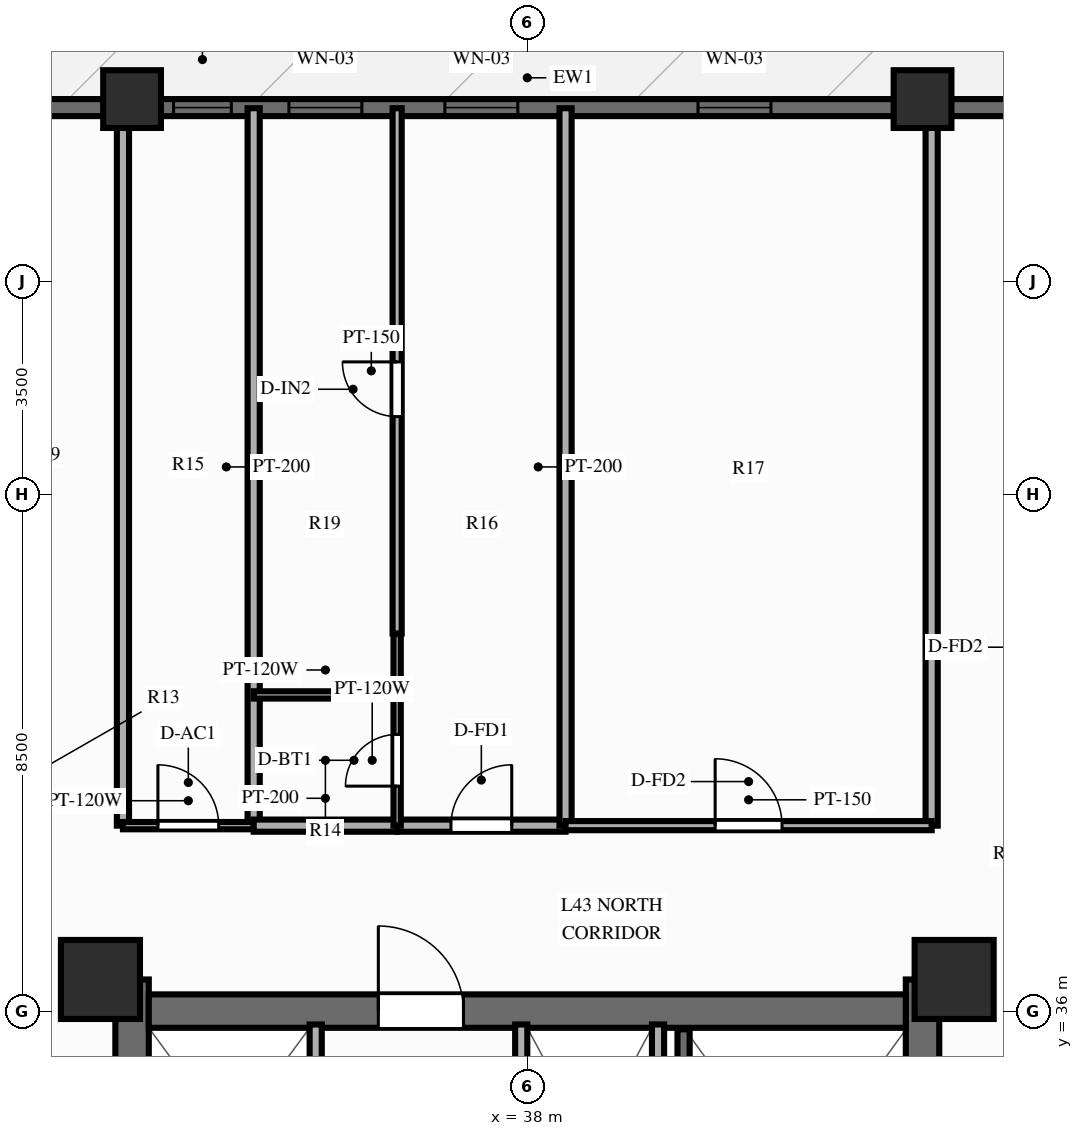
"""IFC4 building model, lengths in metres.
Left out: names, types, materials, properties, quantities, classifications, styles, units other than length and angle.
Written with IfcOpenShell. Run it as: python <this file> out.ifc"""

import sys

from ifc_helpers import new_model, si_unit, direction, frame, frame_2d, origin, origin_2d, place, context, subcontext, project, spatial, rectangle, extrude, source, transform, mapped, element, fill, save


model = new_model("IFC4")
c1 = context("Model", 3, precision=1e-05, world=origin(), true_north=direction((0.0, 1.0)))
c2 = subcontext(c1, "Body", "Model", "MODEL_VIEW")
j1 = project(units=[si_unit("LENGTHUNIT", "METRE"), si_unit("PLANEANGLEUNIT", "RADIAN")], contexts=[c1])
p1 = place(None, origin())
s1 = spatial("IfcSite", under=j1, at=p1, CompositionType="ELEMENT")
p2 = place(p1, origin())
s2 = spatial("IfcBuilding", under=s1, at=p2, CompositionType="ELEMENT")
p3 = place(p2, frame((0.0, 0.0, 135.75)))
s3 = spatial("IfcBuildingStorey", under=s2, at=p3, CompositionType="ELEMENT", Elevation=135.75)
p4 = place(p3, frame((31.5, 17.48, 0.0), z_axis=(0.0, 0.0, 1.0), x_axis=(0.0, 1.0, 0.0)))
e1 = element("IfcWall", 1, at=p4, inside=s3, PredefinedType="SHEAR", context=c2, shape_type="SweptSolid", body=[
    extrude(rectangle(XDim=19.04, YDim=0.55, at=frame_2d((9.52, 0.0))), origin(), (0.0, 0.0, 1.0), 3.0),
])
p5 = place(p4, frame((6.32, 0.0, 0.0)))
e2 = element("IfcOpeningElement", 2, at=p5, cuts=e1, PredefinedType="OPENING", context=c2, shape_type="SweptSolid", body=[
    extrude(rectangle(XDim=1.1, YDim=2.15, at=frame_2d((0.55, 1.075))), frame((0.0, 0.287, 0.0), z_axis=(0.0, -1.0, 0.0), x_axis=(1.0, 0.0, 0.0)), (0.0, 0.0, 1.0), 0.574),
])
p6 = place(p3, frame((44.5, 17.48, 0.0), z_axis=(0.0, 0.0, 1.0), x_axis=(0.0, 1.0, 0.0)))
e3 = element("IfcWall", 3, at=p6, inside=s3, PredefinedType="SHEAR", context=c2, shape_type="SweptSolid", body=[
    extrude(rectangle(XDim=19.04, YDim=0.55, at=frame_2d((9.52, 0.0))), origin(), (0.0, 0.0, 1.0), 3.0),
])
p7 = place(p6, frame((12.67, 0.0, 0.0), z_axis=(0.0, 0.0, 1.0), x_axis=(-1.0, 0.0, 0.0)))
e4 = element("IfcOpeningElement", 4, at=p7, cuts=e3, PredefinedType="OPENING", context=c2, shape_type="SweptSolid", body=[
    extrude(rectangle(XDim=1.1, YDim=2.15, at=frame_2d((0.55, 1.075))), frame((0.0, 0.287, 0.0), z_axis=(0.0, -1.0, 0.0), x_axis=(1.0, 0.0, 0.0)), (0.0, 0.0, 1.0), 0.574),
])
p8 = place(p3, frame((31.775, 36.0, 0.0), z_axis=(0.0, 0.0, 1.0), x_axis=(1.0, 0.0, 0.0)))
e5 = element("IfcWall", 5, at=p8, inside=s3, PredefinedType="SHEAR", context=c2, shape_type="SweptSolid", body=[
    extrude(rectangle(XDim=12.45, YDim=0.55, at=frame_2d((6.225, 0.0))), origin(), (0.0, 0.0, 1.0), 3.0),
])
p9 = place(p8, frame((5.175, 0.0, 0.0), z_axis=(0.0, 0.0, 1.0), x_axis=(-1.0, 0.0, 0.0)))
e6 = element("IfcOpeningElement", 6, at=p9, cuts=e5, PredefinedType="OPENING", context=c2, shape_type="SweptSolid", body=[
    extrude(rectangle(XDim=1.4, YDim=2.15, at=frame_2d((0.7, 1.075))), frame((0.0, 0.287, 0.0), z_axis=(0.0, -1.0, 0.0), x_axis=(1.0, 0.0, 0.0)), (0.0, 0.0, 1.0), 0.574),
])
m1 = source(origin(), c2, "Body", "SweptSolid", [
    extrude(rectangle(XDim=1.3, YDim=1.3, at=origin_2d()), origin(), (0.0, 0.0, 1.0), 3.0),
])
for number, where, z_axis, x_axis in (
    (7, (30.98, 36.52, 0.0), (0.0, 0.0, 1.0), (1.0, 0.0, 0.0)),
    (8, (45.02, 36.52, 0.0), (0.0, 0.0, 1.0), (1.0, 0.0, 0.0)),
):
    element("IfcColumn", number, at=place(p3, frame(where, z_axis=z_axis, x_axis=x_axis)), inside=s3, PredefinedType="COLUMN", context=c2, shape_type="MappedRepresentation", body=[
        mapped(m1, transform((0.0, 0.0, 0.0), scale=1.0)),
    ])
m2 = source(origin(), c2, "Body", "SweptSolid", [
    extrude(rectangle(XDim=0.95, YDim=0.95, at=origin_2d()), origin(), (0.0, 0.0, 1.0), 3.0),
])
for number, where, z_axis, x_axis in (
    (9, (44.5, 51.0, 0.0), (0.0, 0.0, 1.0), (1.0, 0.0, 0.0)),
    (10, (31.5, 51.0, 0.0), (0.0, 0.0, 1.0), (1.0, 0.0, 0.0)),
):
    element("IfcColumn", number, at=place(p3, frame(where, z_axis=z_axis, x_axis=x_axis)), inside=s3, PredefinedType="COLUMN", context=c2, shape_type="MappedRepresentation", body=[
        mapped(m2, transform((0.0, 0.0, 0.0), scale=1.0)),
    ])
p10 = place(p3, frame((16.2, 50.86, 0.0), z_axis=(0.0, 0.0, 1.0), x_axis=(1.0, 0.0, 0.0)))
e11 = element("IfcWall", 11, at=p10, inside=s3, PredefinedType="SOLIDWALL", context=c2, shape_type="SweptSolid", body=[
    extrude(rectangle(XDim=43.6, YDim=0.28, at=frame_2d((21.8, 0.0))), origin(), (0.0, 0.0, 1.0), 2.28),
])
p11 = place(p10, frame((7.1, 0.0, 0.0)))
e12 = element("IfcOpeningElement", 12, at=p11, cuts=e11, PredefinedType="OPENING", context=c2, shape_type="SweptSolid", body=[
    extrude(rectangle(XDim=1.1, YDim=2.15, at=frame_2d((0.55, 1.075))), frame((0.0, 0.152, 0.0), z_axis=(0.0, -1.0, 0.0), x_axis=(1.0, 0.0, 0.0)), (0.0, 0.0, 1.0), 0.304),
])
p12 = place(p10, frame((15.982, 0.0, 0.25)))
e13 = element("IfcOpeningElement", 13, at=p12, cuts=e11, PredefinedType="OPENING", context=c2, shape_type="SweptSolid", body=[
    extrude(rectangle(XDim=0.95, YDim=1.5, at=frame_2d((0.475, 0.75))), frame((0.0, 0.152, 0.0), z_axis=(0.0, -1.0, 0.0), x_axis=(1.0, 0.0, 0.0)), (0.0, 0.0, 1.0), 0.304),
])
p13 = place(p10, frame((17.88, 0.0, 0.25)))
e14 = element("IfcOpeningElement", 14, at=p13, cuts=e11, PredefinedType="OPENING", context=c2, shape_type="SweptSolid", body=[
    extrude(rectangle(XDim=1.2, YDim=1.5, at=frame_2d((0.6, 0.75))), frame((0.0, 0.152, 0.0), z_axis=(0.0, -1.0, 0.0), x_axis=(1.0, 0.0, 0.0)), (0.0, 0.0, 1.0), 0.304),
])
p14 = place(p10, frame((20.444, 0.0, 0.25)))
e15 = element("IfcOpeningElement", 15, at=p14, cuts=e11, PredefinedType="OPENING", context=c2, shape_type="SweptSolid", body=[
    extrude(rectangle(XDim=1.2, YDim=1.5, at=frame_2d((0.6, 0.75))), frame((0.0, 0.152, 0.0), z_axis=(0.0, -1.0, 0.0), x_axis=(1.0, 0.0, 0.0)), (0.0, 0.0, 1.0), 0.304),
])
p15 = place(p10, frame((24.607, 0.0, 0.25)))
e16 = element("IfcOpeningElement", 16, at=p15, cuts=e11, PredefinedType="OPENING", context=c2, shape_type="SweptSolid", body=[
    extrude(rectangle(XDim=1.2, YDim=1.5, at=frame_2d((0.6, 0.75))), frame((0.0, 0.152, 0.0), z_axis=(0.0, -1.0, 0.0), x_axis=(1.0, 0.0, 0.0)), (0.0, 0.0, 1.0), 0.304),
])
p16 = place(p10, frame((35.35, 0.0, 0.25)))
e17 = element("IfcOpeningElement", 17, at=p16, cuts=e11, PredefinedType="OPENING", context=c2, shape_type="SweptSolid", body=[
    extrude(rectangle(XDim=1.2, YDim=1.5, at=frame_2d((0.6, 0.75))), frame((0.0, 0.152, 0.0), z_axis=(0.0, -1.0, 0.0), x_axis=(1.0, 0.0, 0.0)), (0.0, 0.0, 1.0), 0.304),
])
p17 = place(p3, frame((40.15, 31.8, 0.0), z_axis=(0.0, 0.0, 1.0), x_axis=(0.0, 1.0, 0.0)))
e18 = element("IfcWall", 18, at=p17, inside=s3, PredefinedType="PARTITIONING", context=c2, shape_type="SweptSolid", body=[
    extrude(rectangle(XDim=3.98, YDim=0.2, at=frame_2d((1.99, 0.0))), origin(), (0.0, 0.0, 1.0), 2.79),
])
p18 = place(p3, frame((40.57, 28.65, 0.0), z_axis=(0.0, 0.0, 1.0), x_axis=(0.0, 1.0, 0.0)))
e19 = element("IfcWall", 19, at=p18, inside=s3, PredefinedType="SOLIDWALL", context=c2, shape_type="SweptSolid", body=[
    extrude(rectangle(XDim=7.05, YDim=0.2, at=frame_2d((3.525, 0.0))), origin(), (0.0, 0.0, 1.0), 2.79),
])
p19 = place(p3, frame((34.52, 25.44, 0.0), z_axis=(0.0, 0.0, 1.0), x_axis=(0.0, 1.0, 0.0)))
e20 = element("IfcWall", 20, at=p19, inside=s3, PredefinedType="PARTITIONING", context=c2, shape_type="SweptSolid", body=[
    extrude(rectangle(XDim=10.34, YDim=0.2, at=frame_2d((5.17, 0.0))), origin(), (0.0, 0.0, 1.0), 2.79),
])
p20 = place(p19, frame((2.6, 0.0, 0.0)))
e21 = element("IfcOpeningElement", 21, at=p20, cuts=e20, PredefinedType="OPENING", context=c2, shape_type="SweptSolid", body=[
    extrude(rectangle(XDim=0.9, YDim=2.1, at=frame_2d((0.45, 1.05))), frame((0.0, 0.112, 0.0), z_axis=(0.0, -1.0, 0.0), x_axis=(1.0, 0.0, 0.0)), (0.0, 0.0, 1.0), 0.224),
])
p21 = place(p3, frame((37.9, 25.44, 0.0), z_axis=(0.0, 0.0, 1.0), x_axis=(0.0, 1.0, 0.0)))
e22 = element("IfcWall", 22, at=p21, inside=s3, PredefinedType="PARTITIONING", context=c2, shape_type="SweptSolid", body=[
    extrude(rectangle(XDim=10.34, YDim=0.2, at=frame_2d((5.17, 0.0))), origin(), (0.0, 0.0, 1.0), 2.79),
])
p22 = place(p21, frame((0.32, 0.0, 0.0)))
e23 = element("IfcOpeningElement", 23, at=p22, cuts=e22, PredefinedType="OPENING", context=c2, shape_type="SweptSolid", body=[
    extrude(rectangle(XDim=1.0, YDim=2.15, at=frame_2d((0.5, 1.075))), frame((0.0, 0.112, 0.0), z_axis=(0.0, -1.0, 0.0), x_axis=(1.0, 0.0, 0.0)), (0.0, 0.0, 1.0), 0.224),
])
p23 = place(p21, frame((1.71, 0.0, 0.0)))
e24 = element("IfcOpeningElement", 24, at=p23, cuts=e22, PredefinedType="OPENING", context=c2, shape_type="SweptSolid", body=[
    extrude(rectangle(XDim=1.0, YDim=2.15, at=frame_2d((0.5, 1.075))), frame((0.0, 0.112, 0.0), z_axis=(0.0, -1.0, 0.0), x_axis=(1.0, 0.0, 0.0)), (0.0, 0.0, 1.0), 0.224),
])
p24 = place(p21, frame((3.51, 0.0, 0.0)))
e25 = element("IfcOpeningElement", 25, at=p24, cuts=e22, PredefinedType="OPENING", context=c2, shape_type="SweptSolid", body=[
    extrude(rectangle(XDim=1.0, YDim=2.15, at=frame_2d((0.5, 1.075))), frame((0.0, 0.112, 0.0), z_axis=(0.0, -1.0, 0.0), x_axis=(1.0, 0.0, 0.0)), (0.0, 0.0, 1.0), 0.224),
])
p25 = place(p21, frame((5.01, 0.0, 0.0)))
e26 = element("IfcOpeningElement", 26, at=p25, cuts=e22, PredefinedType="OPENING", context=c2, shape_type="SweptSolid", body=[
    extrude(rectangle(XDim=1.0, YDim=2.15, at=frame_2d((0.5, 1.075))), frame((0.0, 0.112, 0.0), z_axis=(0.0, -1.0, 0.0), x_axis=(1.0, 0.0, 0.0)), (0.0, 0.0, 1.0), 0.224),
])
for number, where, z_axis, x_axis in (
    (27, (31.35, 39.05, 0.0), (0.0, 0.0, 1.0), (0.0, 1.0, 0.0)),
    (28, (44.65, 39.05, 0.0), (0.0, 0.0, 1.0), (0.0, 1.0, 0.0)),
):
    element("IfcWall", number, at=place(p3, frame(where, z_axis=z_axis, x_axis=x_axis)), inside=s3, PredefinedType="PARTITIONING", context=c2, shape_type="SweptSolid", body=[
        extrude(rectangle(XDim=11.8, YDim=0.2, at=frame_2d((5.9, 0.0))), origin(), (0.0, 0.0, 1.0), 2.34),
    ])
p26 = place(p3, frame((33.5, 39.05, 0.0), z_axis=(0.0, 0.0, 1.0), x_axis=(0.0, 1.0, 0.0)))
e29 = element("IfcWall", 29, at=p26, inside=s3, PredefinedType="PARTITIONING", context=c2, shape_type="SweptSolid", body=[
    extrude(rectangle(XDim=11.8, YDim=0.2, at=frame_2d((5.9, 0.0))), origin(), (0.0, 0.0, 1.0), 2.79),
])
p27 = place(p3, frame((31.35, 39.05, 0.0), z_axis=(0.0, 0.0, 1.0), x_axis=(1.0, 0.0, 0.0)))
e30 = element("IfcWall", 30, at=p27, inside=s3, PredefinedType="PARTITIONING", context=c2, shape_type="SweptSolid", body=[
    extrude(rectangle(XDim=2.15, YDim=0.12, at=frame_2d((1.075, 0.0))), origin(), (0.0, 0.0, 1.0), 2.79),
])
p28 = place(p27, frame((0.575, 0.0, 0.0)))
e31 = element("IfcOpeningElement", 31, at=p28, cuts=e30, PredefinedType="OPENING", context=c2, shape_type="SweptSolid", body=[
    extrude(rectangle(XDim=1.0, YDim=2.1, at=frame_2d((0.5, 1.05))), frame((0.0, 0.072, 0.0), z_axis=(0.0, -1.0, 0.0), x_axis=(1.0, 0.0, 0.0)), (0.0, 0.0, 1.0), 0.144),
])
p29 = place(p3, frame((33.5, 39.05, 0.0), z_axis=(0.0, 0.0, 1.0), x_axis=(1.0, 0.0, 0.0)))
e32 = element("IfcWall", 32, at=p29, inside=s3, PredefinedType="PARTITIONING", context=c2, shape_type="SweptSolid", body=[
    extrude(rectangle(XDim=2.359, YDim=0.2, at=frame_2d((1.18, 0.0))), origin(), (0.0, 0.0, 1.0), 2.79),
])
p30 = place(p3, frame((35.859, 39.05, 0.0), z_axis=(0.0, 0.0, 1.0), x_axis=(1.0, 0.0, 0.0)))
e33 = element("IfcWall", 33, at=p30, inside=s3, PredefinedType="PARTITIONING", context=c2, shape_type="SweptSolid", body=[
    extrude(rectangle(XDim=2.77, YDim=0.2, at=frame_2d((1.385, 0.0))), origin(), (0.0, 0.0, 1.0), 2.79),
])
p31 = place(p30, frame((0.885, 0.0, 0.0)))
e34 = element("IfcOpeningElement", 34, at=p31, cuts=e33, PredefinedType="OPENING", context=c2, shape_type="SweptSolid", body=[
    extrude(rectangle(XDim=1.0, YDim=2.15, at=frame_2d((0.5, 1.075))), frame((0.0, 0.112, 0.0), z_axis=(0.0, -1.0, 0.0), x_axis=(1.0, 0.0, 0.0)), (0.0, 0.0, 1.0), 0.224),
])
p32 = place(p3, frame((35.859, 39.05, 0.0), z_axis=(0.0, 0.0, 1.0), x_axis=(0.0, 1.0, 0.0)))
e35 = element("IfcWall", 35, at=p32, inside=s3, PredefinedType="PARTITIONING", context=c2, shape_type="SweptSolid", body=[
    extrude(rectangle(XDim=2.15, YDim=0.12, at=frame_2d((1.075, 0.0))), origin(), (0.0, 0.0, 1.0), 2.79),
])
p33 = place(p32, frame((0.65, 0.0, 0.0)))
e36 = element("IfcOpeningElement", 36, at=p33, cuts=e35, PredefinedType="OPENING", context=c2, shape_type="SweptSolid", body=[
    extrude(rectangle(XDim=0.85, YDim=2.05, at=frame_2d((0.425, 1.025))), frame((0.0, 0.072, 0.0), z_axis=(0.0, -1.0, 0.0), x_axis=(1.0, 0.0, 0.0)), (0.0, 0.0, 1.0), 0.144),
])
p34 = place(p3, frame((35.859, 41.2, 0.0), z_axis=(0.0, 0.0, 1.0), x_axis=(0.0, 1.0, 0.0)))
e37 = element("IfcWall", 37, at=p34, inside=s3, PredefinedType="PARTITIONING", context=c2, shape_type="SweptSolid", body=[
    extrude(rectangle(XDim=1.01, YDim=0.12, at=frame_2d((0.505, 0.0))), origin(), (0.0, 0.0, 1.0), 2.79),
])
p35 = place(p3, frame((33.5, 41.2, 0.0), z_axis=(0.0, 0.0, 1.0), x_axis=(1.0, 0.0, 0.0)))
e38 = element("IfcWall", 38, at=p35, inside=s3, PredefinedType="PARTITIONING", context=c2, shape_type="SweptSolid", body=[
    extrude(rectangle(XDim=2.359, YDim=0.12, at=frame_2d((1.18, 0.0))), origin(), (0.0, 0.0, 1.0), 2.79),
])
p36 = place(p3, frame((35.859, 42.21, 0.0), z_axis=(0.0, 0.0, 1.0), x_axis=(0.0, 1.0, 0.0)))
e39 = element("IfcWall", 39, at=p36, inside=s3, PredefinedType="PARTITIONING", context=c2, shape_type="SweptSolid", body=[
    extrude(rectangle(XDim=8.64, YDim=0.15, at=frame_2d((4.32, 0.0))), origin(), (0.0, 0.0, 1.0), 2.79),
])
p37 = place(p36, frame((3.567, 0.0, 0.0)))
e40 = element("IfcOpeningElement", 40, at=p37, cuts=e39, PredefinedType="OPENING", context=c2, shape_type="SweptSolid", body=[
    extrude(rectangle(XDim=0.9, YDim=2.1, at=frame_2d((0.45, 1.05))), frame((0.0, 0.087, 0.0), z_axis=(0.0, -1.0, 0.0), x_axis=(1.0, 0.0, 0.0)), (0.0, 0.0, 1.0), 0.174),
])
p38 = place(p3, frame((38.629, 39.05, 0.0), z_axis=(0.0, 0.0, 1.0), x_axis=(0.0, 1.0, 0.0)))
e41 = element("IfcWall", 41, at=p38, inside=s3, PredefinedType="PARTITIONING", context=c2, shape_type="SweptSolid", body=[
    extrude(rectangle(XDim=11.8, YDim=0.2, at=frame_2d((5.9, 0.0))), origin(), (0.0, 0.0, 1.0), 2.79),
])
p39 = place(p3, frame((38.629, 39.05, 0.0), z_axis=(0.0, 0.0, 1.0), x_axis=(1.0, 0.0, 0.0)))
e42 = element("IfcWall", 42, at=p39, inside=s3, PredefinedType="PARTITIONING", context=c2, shape_type="SweptSolid", body=[
    extrude(rectangle(XDim=6.021, YDim=0.15, at=frame_2d((3.01, 0.0))), origin(), (0.0, 0.0, 1.0), 2.79),
])
p40 = place(p39, frame((2.46, 0.0, 0.0)))
e43 = element("IfcOpeningElement", 43, at=p40, cuts=e42, PredefinedType="OPENING", context=c2, shape_type="SweptSolid", body=[
    extrude(rectangle(XDim=1.1, YDim=2.15, at=frame_2d((0.55, 1.075))), frame((0.0, 0.087, 0.0), z_axis=(0.0, -1.0, 0.0), x_axis=(1.0, 0.0, 0.0)), (0.0, 0.0, 1.0), 0.174),
])
m3 = source(origin(), c2, "Body", "SweptSolid", [
    extrude(rectangle(XDim=0.95, YDim=1.5, at=frame_2d((0.475, 0.75))), frame((0.0, 0.03, 0.0), z_axis=(0.0, -1.0, 0.0), x_axis=(1.0, 0.0, 0.0)), (0.0, 0.0, 1.0), 0.06),
])
p41 = place(p12, origin())
e44 = element("IfcWindow", 44, at=p41, inside=s3, PartitioningType="SINGLE_PANEL", PredefinedType="WINDOW", context=c2, shape_type="MappedRepresentation", body=[
    mapped(m3, transform((0.0, 0.0, 0.0), scale=1.0)),
])
fill(e13, e44)
m4 = source(origin(), c2, "Body", "SweptSolid", [
    extrude(rectangle(XDim=1.2, YDim=1.5, at=frame_2d((0.6, 0.75))), frame((0.0, 0.03, 0.0), z_axis=(0.0, -1.0, 0.0), x_axis=(1.0, 0.0, 0.0)), (0.0, 0.0, 1.0), 0.06),
])
p42 = place(p13, origin())
e45 = element("IfcWindow", 45, at=p42, inside=s3, PartitioningType="SINGLE_PANEL", PredefinedType="WINDOW", context=c2, shape_type="MappedRepresentation", body=[
    mapped(m4, transform((0.0, 0.0, 0.0), scale=1.0)),
])
fill(e14, e45)
p43 = place(p14, origin())
e46 = element("IfcWindow", 46, at=p43, inside=s3, PartitioningType="SINGLE_PANEL", PredefinedType="WINDOW", context=c2, shape_type="MappedRepresentation", body=[
    mapped(m4, transform((0.0, 0.0, 0.0), scale=1.0)),
])
fill(e15, e46)
p44 = place(p15, origin())
e47 = element("IfcWindow", 47, at=p44, inside=s3, PartitioningType="SINGLE_PANEL", PredefinedType="WINDOW", context=c2, shape_type="MappedRepresentation", body=[
    mapped(m4, transform((0.0, 0.0, 0.0), scale=1.0)),
])
fill(e16, e47)
m5 = source(origin(), c2, "Body", "SweptSolid", [
    extrude(rectangle(XDim=1.4, YDim=2.15, at=frame_2d((0.7, 1.075))), frame((0.0, 0.025, 0.0), z_axis=(0.0, -1.0, 0.0), x_axis=(1.0, 0.0, 0.0)), (0.0, 0.0, 1.0), 0.05),
])
p45 = place(p9, origin())
e48 = element("IfcDoor", 48, at=p45, inside=s3, OperationType="SINGLE_SWING_RIGHT", PredefinedType="DOOR", context=c2, shape_type="MappedRepresentation", body=[
    mapped(m5, transform((0.0, 0.0, 0.0), scale=1.0)),
])
fill(e6, e48)
m6 = source(origin(), c2, "Body", "SweptSolid", [
    extrude(rectangle(XDim=1.0, YDim=2.1, at=frame_2d((0.5, 1.05))), frame((0.0, 0.025, 0.0), z_axis=(0.0, -1.0, 0.0), x_axis=(1.0, 0.0, 0.0)), (0.0, 0.0, 1.0), 0.05),
])
p46 = place(p28, origin())
e49 = element("IfcDoor", 49, at=p46, inside=s3, OperationType="SINGLE_SWING_LEFT", PredefinedType="DOOR", context=c2, shape_type="MappedRepresentation", body=[
    mapped(m6, transform((0.0, 0.0, 0.0), scale=1.0)),
])
fill(e31, e49)
m7 = source(origin(), c2, "Body", "SweptSolid", [
    extrude(rectangle(XDim=1.0, YDim=2.15, at=frame_2d((0.5, 1.075))), frame((0.0, 0.025, 0.0), z_axis=(0.0, -1.0, 0.0), x_axis=(1.0, 0.0, 0.0)), (0.0, 0.0, 1.0), 0.05),
])
p47 = place(p31, origin())
e50 = element("IfcDoor", 50, at=p47, inside=s3, OperationType="SINGLE_SWING_RIGHT", PredefinedType="DOOR", context=c2, shape_type="MappedRepresentation", body=[
    mapped(m7, transform((0.0, 0.0, 0.0), scale=1.0)),
])
fill(e34, e50)
m8 = source(origin(), c2, "Body", "SweptSolid", [
    extrude(rectangle(XDim=0.85, YDim=2.05, at=frame_2d((0.425, 1.025))), frame((0.0, 0.025, 0.0), z_axis=(0.0, -1.0, 0.0), x_axis=(1.0, 0.0, 0.0)), (0.0, 0.0, 1.0), 0.05),
])
p48 = place(p33, origin())
e51 = element("IfcDoor", 51, at=p48, inside=s3, OperationType="SINGLE_SWING_LEFT", PredefinedType="DOOR", context=c2, shape_type="MappedRepresentation", body=[
    mapped(m8, transform((0.0, 0.0, 0.0), scale=1.0)),
])
fill(e36, e51)
m9 = source(origin(), c2, "Body", "SweptSolid", [
    extrude(rectangle(XDim=0.9, YDim=2.1, at=frame_2d((0.45, 1.05))), frame((0.0, 0.025, 0.0), z_axis=(0.0, -1.0, 0.0), x_axis=(1.0, 0.0, 0.0)), (0.0, 0.0, 1.0), 0.05),
])
p49 = place(p37, origin())
e52 = element("IfcDoor", 52, at=p49, inside=s3, OperationType="SINGLE_SWING_RIGHT", PredefinedType="DOOR", context=c2, shape_type="MappedRepresentation", body=[
    mapped(m9, transform((0.0, 0.0, 0.0), scale=1.0)),
])
fill(e40, e52)
m10 = source(origin(), c2, "Body", "SweptSolid", [
    extrude(rectangle(XDim=1.1, YDim=2.15, at=frame_2d((0.55, 1.075))), frame((0.0, 0.025, 0.0), z_axis=(0.0, -1.0, 0.0), x_axis=(1.0, 0.0, 0.0)), (0.0, 0.0, 1.0), 0.05),
])
p50 = place(p40, origin())
e53 = element("IfcDoor", 53, at=p50, inside=s3, OperationType="SINGLE_SWING_LEFT", PredefinedType="DOOR", context=c2, shape_type="MappedRepresentation", body=[
    mapped(m10, transform((0.0, 0.0, 0.0), scale=1.0)),
])
fill(e43, e53)
save(model, sys.argv[1])
